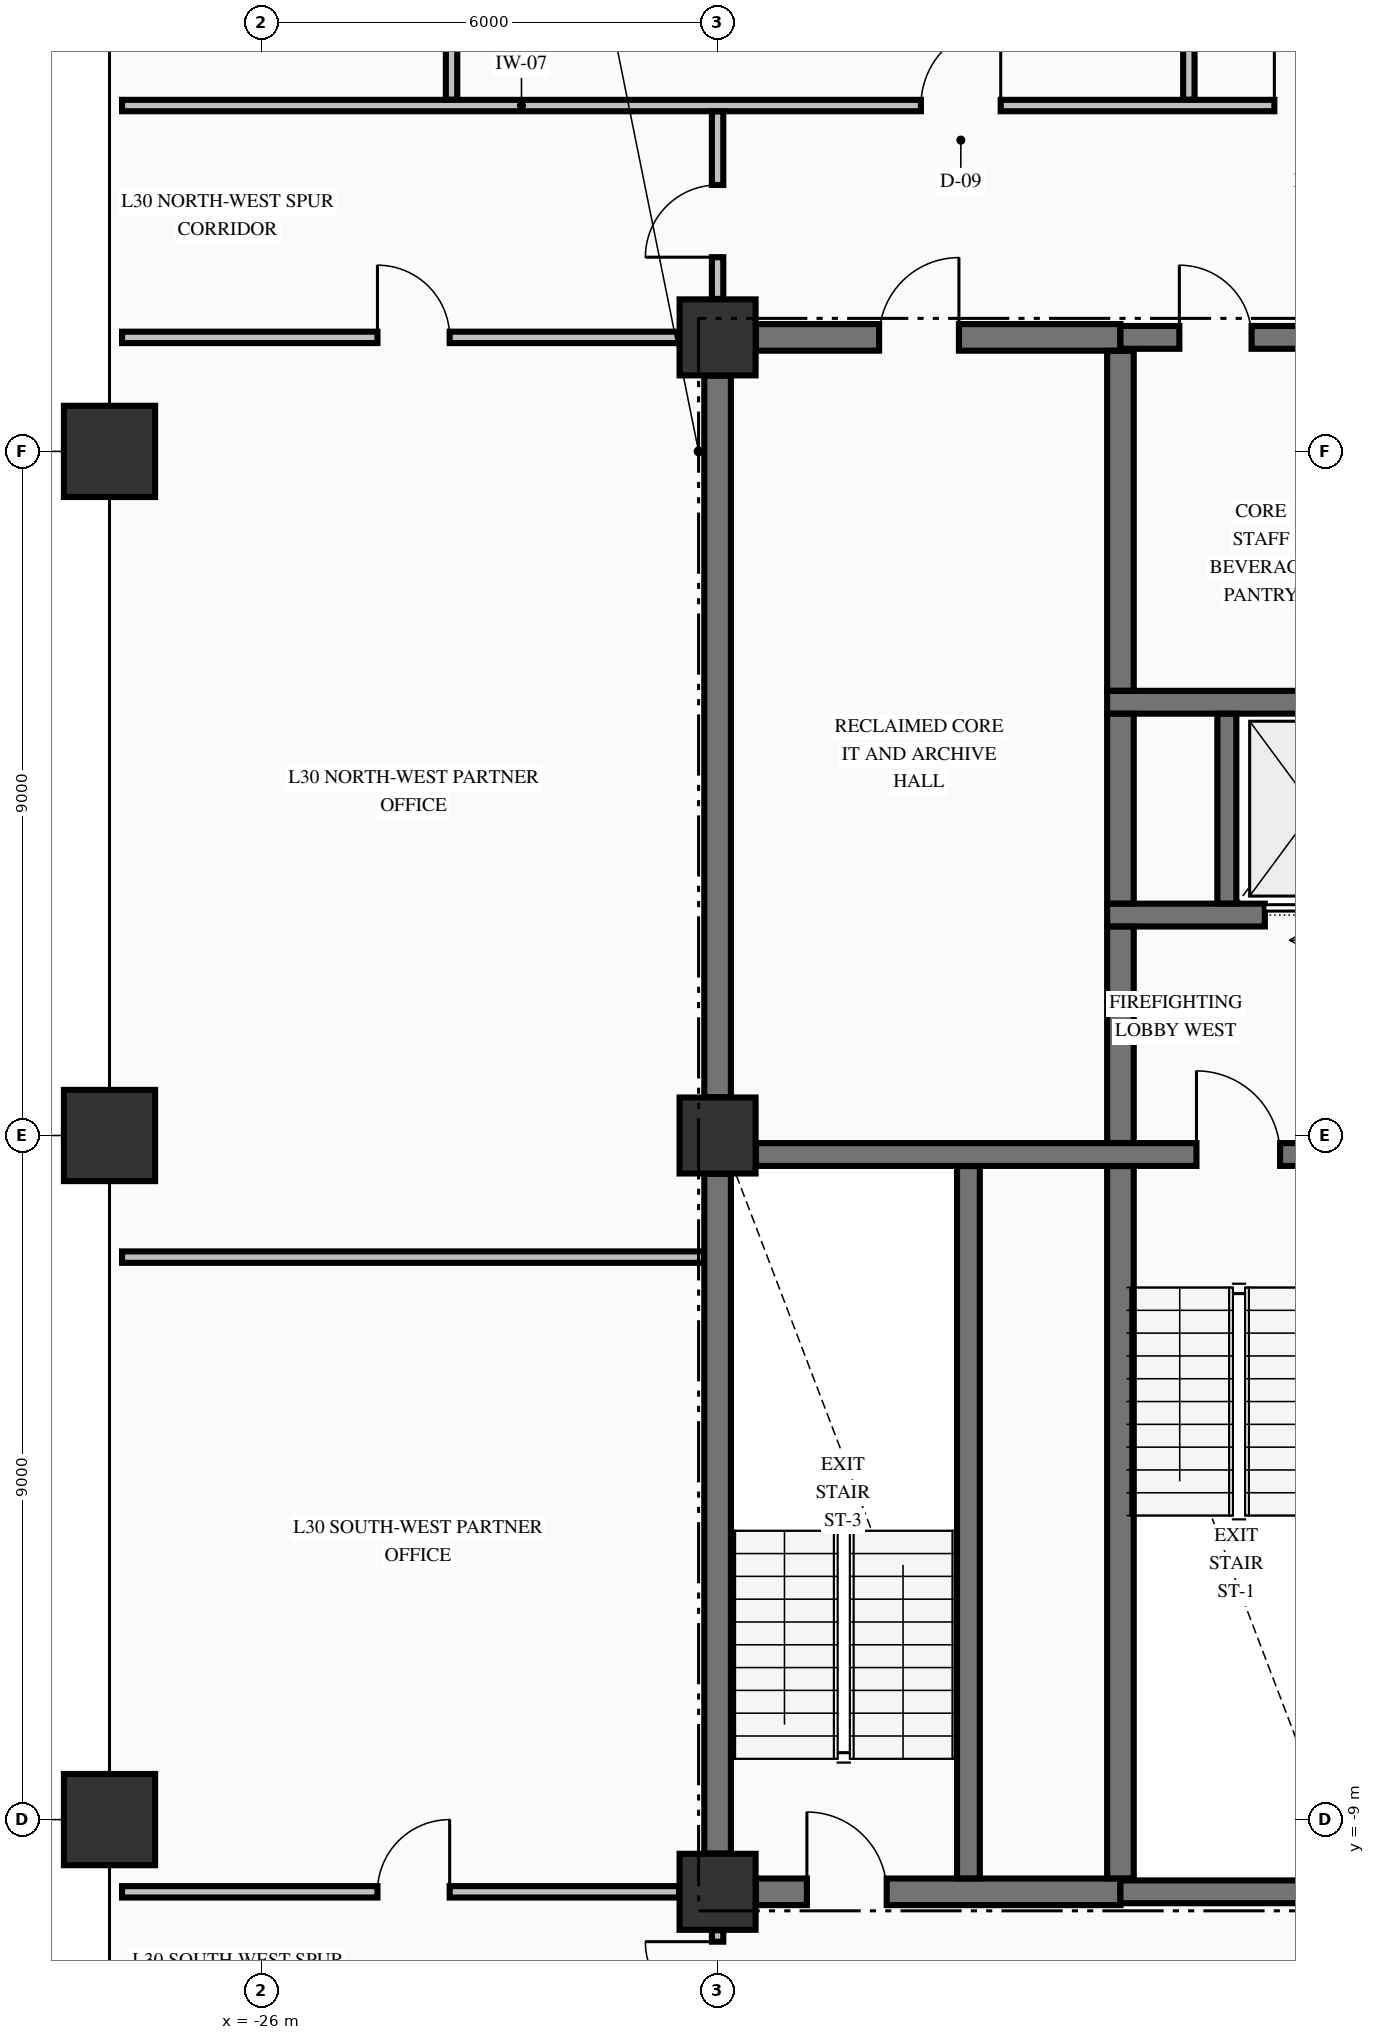
"""IFC4 building model, lengths in metres.
Left out: names, types, materials, properties, quantities, classifications, styles, units other than length and angle.
Written with IfcOpenShell. Run it as: python <this file> out.ifc"""

import sys

from ifc_helpers import new_model, si_unit, direction, frame, frame_2d, origin, origin_2d, place, context, subcontext, project, spatial, rectangle, extrude, element, fill, save


model = new_model("IFC4")
c1 = context("Model", 3, precision=1e-05, world=origin(), true_north=direction((0.0, 1.0)))
c2 = subcontext(c1, "Body", "Model", "MODEL_VIEW")
j1 = project(units=[si_unit("LENGTHUNIT", "METRE"), si_unit("PLANEANGLEUNIT", "RADIAN")], contexts=[c1])
p1 = place(None, origin())
s1 = spatial("IfcSite", under=j1, at=p1, CompositionType="ELEMENT")
p2 = place(p1, origin())
s2 = spatial("IfcBuilding", under=s1, at=p2, CompositionType="ELEMENT")
p3 = place(p2, frame((0.0, 0.0, 121.35)))
s3 = spatial("IfcBuildingStorey", under=s2, at=p3, CompositionType="ELEMENT", Elevation=121.35)
for number, where, z_axis, x_axis in (
    (1, (-28.0, -9.0, -0.425), (0.0, 0.0, 1.0), (1.0, 0.0, 0.0)),
    (2, (-28.0, 0.0, -0.425), (0.0, 0.0, 1.0), (1.0, 0.0, 0.0)),
    (3, (-28.0, 9.0, -0.425), (0.0, 0.0, 1.0), (1.0, 0.0, 0.0)),
):
    element("IfcColumn", number, at=place(p3, frame(where, z_axis=z_axis, x_axis=x_axis)), inside=s3, PredefinedType="COLUMN", context=c2, shape_type="SweptSolid", body=[
        extrude(rectangle(XDim=1.2, YDim=1.2, at=origin_2d()), origin(), (0.0, 0.0, 1.0), 3.745),
    ])
for number, where, z_axis, x_axis in (
    (4, (-20.0, -9.95, -0.425), (0.0, 0.0, 1.0), (1.0, 0.0, 0.0)),
    (5, (-20.0, 10.5, -0.425), (0.0, 0.0, 1.0), (1.0, 0.0, 0.0)),
    (6, (-20.0, 0.0, -0.425), (0.0, 0.0, 1.0), (1.0, 0.0, 0.0)),
):
    element("IfcColumn", number, at=place(p3, frame(where, z_axis=z_axis, x_axis=x_axis)), inside=s3, PredefinedType="COLUMN", context=c2, shape_type="SweptSolid", body=[
        extrude(rectangle(XDim=1.0, YDim=1.0, at=origin_2d()), origin(), (0.0, 0.0, 1.0), 3.745),
    ])
p4 = place(p3, frame((-19.496, -9.95, 0.0), z_axis=(0.0, 0.0, 1.0), x_axis=(1.0, 0.0, 0.0)))
e7 = element("IfcWall", 7, at=p4, inside=s3, PredefinedType="SHEAR", context=c2, shape_type="SweptSolid", body=[
    extrude(rectangle(XDim=4.796, YDim=0.35, at=frame_2d((2.398, 0.0))), origin(), (0.0, 0.0, 1.0), 3.32),
])
p5 = place(p4, frame((0.671, 0.0, 0.0)))
e8 = element("IfcOpeningElement", 8, at=p5, cuts=e7, PredefinedType="OPENING", context=c2, shape_type="SweptSolid", body=[
    extrude(rectangle(XDim=1.05, YDim=2.15, at=frame_2d((0.525, 1.075))), frame((0.0, 0.185, 0.0), z_axis=(0.0, -1.0, 0.0), x_axis=(1.0, 0.0, 0.0)), (0.0, 0.0, 1.0), 0.37),
])
p6 = place(p3, frame((-14.7, -9.95, 0.0), z_axis=(0.0, 0.0, 1.0), x_axis=(1.0, 0.0, 0.0)))
e9 = element("IfcWall", 9, at=p6, inside=s3, PredefinedType="SHEAR", context=c2, shape_type="SweptSolid", body=[
    extrude(rectangle(XDim=3.196, YDim=0.3, at=frame_2d((1.598, 0.0))), origin(), (0.0, 0.0, 1.0), 3.32),
])
p7 = place(p3, frame((-19.496, -0.25, 0.0), z_axis=(0.0, 0.0, 1.0), x_axis=(1.0, 0.0, 0.0)))
e10 = element("IfcWall", 10, at=p7, inside=s3, PredefinedType="SHEAR", context=c2, shape_type="SweptSolid", body=[
    extrude(rectangle(XDim=7.992, YDim=0.3, at=frame_2d((3.996, 0.0))), origin(), (0.0, 0.0, 1.0), 3.32),
])
p8 = place(p7, frame((5.796, 0.0, 0.0)))
e11 = element("IfcOpeningElement", 11, at=p8, cuts=e10, PredefinedType="OPENING", context=c2, shape_type="SweptSolid", body=[
    extrude(rectangle(XDim=1.1, YDim=2.15, at=frame_2d((0.55, 1.075))), frame((0.0, 0.16, 0.0), z_axis=(0.0, -1.0, 0.0), x_axis=(1.0, 0.0, 0.0)), (0.0, 0.0, 1.0), 0.32),
])
p9 = place(p3, frame((-14.875, 2.9, 0.0), z_axis=(0.0, 0.0, 1.0), x_axis=(1.0, 0.0, 0.0)))
e12 = element("IfcWall", 12, at=p9, inside=s3, PredefinedType="SHEAR", context=c2, shape_type="SweptSolid", body=[
    extrude(rectangle(XDim=4.025, YDim=0.3, at=frame_2d((2.012, 0.0))), origin(), (0.0, 0.0, 1.0), 3.32),
])
p10 = place(p9, frame((2.075, 0.0, 0.0)))
e13 = element("IfcOpeningElement", 13, at=p10, cuts=e12, PredefinedType="OPENING", context=c2, shape_type="SweptSolid", body=[
    extrude(rectangle(XDim=1.1, YDim=2.2, at=frame_2d((0.55, 1.1))), frame((0.0, 0.16, 0.0), z_axis=(0.0, -1.0, 0.0), x_axis=(1.0, 0.0, 0.0)), (0.0, 0.0, 1.0), 0.32),
])
p11 = place(p3, frame((-14.875, 5.7, 0.0), z_axis=(0.0, 0.0, 1.0), x_axis=(1.0, 0.0, 0.0)))
e14 = element("IfcWall", 14, at=p11, inside=s3, PredefinedType="SHEAR", context=c2, shape_type="SweptSolid", body=[
    extrude(rectangle(XDim=4.025, YDim=0.3, at=frame_2d((2.012, 0.0))), origin(), (0.0, 0.0, 1.0), 3.32),
])
p12 = place(p3, frame((-19.496, 10.5, 0.0), z_axis=(0.0, 0.0, 1.0), x_axis=(1.0, 0.0, 0.0)))
e15 = element("IfcWall", 15, at=p12, inside=s3, PredefinedType="SHEAR", context=c2, shape_type="SweptSolid", body=[
    extrude(rectangle(XDim=4.796, YDim=0.35, at=frame_2d((2.398, 0.0))), origin(), (0.0, 0.0, 1.0), 3.32),
])
p13 = place(p12, frame((1.621, 0.0, 0.0)))
e16 = element("IfcOpeningElement", 16, at=p13, cuts=e15, PredefinedType="OPENING", context=c2, shape_type="SweptSolid", body=[
    extrude(rectangle(XDim=1.05, YDim=2.15, at=frame_2d((0.525, 1.075))), frame((0.0, 0.185, 0.0), z_axis=(0.0, -1.0, 0.0), x_axis=(1.0, 0.0, 0.0)), (0.0, 0.0, 1.0), 0.37),
])
p14 = place(p3, frame((-14.7, 10.5, 0.0), z_axis=(0.0, 0.0, 1.0), x_axis=(1.0, 0.0, 0.0)))
e17 = element("IfcWall", 17, at=p14, inside=s3, PredefinedType="SHEAR", context=c2, shape_type="SweptSolid", body=[
    extrude(rectangle(XDim=3.196, YDim=0.3, at=frame_2d((1.598, 0.0))), origin(), (0.0, 0.0, 1.0), 3.32),
])
p15 = place(p14, frame((0.775, 0.0, 0.0)))
e18 = element("IfcOpeningElement", 18, at=p15, cuts=e17, PredefinedType="OPENING", context=c2, shape_type="SweptSolid", body=[
    extrude(rectangle(XDim=0.95, YDim=2.15, at=frame_2d((0.475, 1.075))), frame((0.0, 0.16, 0.0), z_axis=(0.0, -1.0, 0.0), x_axis=(1.0, 0.0, 0.0)), (0.0, 0.0, 1.0), 0.32),
])
p16 = place(p3, frame((-27.835, -9.95, 0.0), z_axis=(0.0, 0.0, 1.0), x_axis=(1.0, 0.0, 0.0)))
e19 = element("IfcWall", 19, at=p16, inside=s3, PredefinedType="PARTITIONING", context=c2, shape_type="SweptSolid", body=[
    extrude(rectangle(XDim=7.329, YDim=0.15, at=frame_2d((3.665, 0.0))), origin(), (0.0, 0.0, 1.0), 3.32),
])
p17 = place(p16, frame((3.36, 0.0, 0.0)))
e20 = element("IfcOpeningElement", 20, at=p17, cuts=e19, PredefinedType="OPENING", context=c2, shape_type="SweptSolid", body=[
    extrude(rectangle(XDim=0.95, YDim=2.15, at=frame_2d((0.475, 1.075))), frame((0.0, 0.085, 0.0), z_axis=(0.0, -1.0, 0.0), x_axis=(1.0, 0.0, 0.0)), (0.0, 0.0, 1.0), 0.17),
])
p18 = place(p3, frame((-27.835, -1.6, 0.0), z_axis=(0.0, 0.0, 1.0), x_axis=(1.0, 0.0, 0.0)))
e21 = element("IfcWall", 21, at=p18, inside=s3, PredefinedType="PARTITIONING", context=c2, shape_type="SweptSolid", body=[
    extrude(rectangle(XDim=7.657, YDim=0.15, at=frame_2d((3.829, 0.0))), origin(), (0.0, 0.0, 1.0), 3.32),
])
p19 = place(p3, frame((-27.835, 10.5, 0.0), z_axis=(0.0, 0.0, 1.0), x_axis=(1.0, 0.0, 0.0)))
e22 = element("IfcWall", 22, at=p19, inside=s3, PredefinedType="PARTITIONING", context=c2, shape_type="SweptSolid", body=[
    extrude(rectangle(XDim=7.329, YDim=0.15, at=frame_2d((3.665, 0.0))), origin(), (0.0, 0.0, 1.0), 3.32),
])
p20 = place(p19, frame((3.36, 0.0, 0.0)))
e23 = element("IfcOpeningElement", 23, at=p20, cuts=e22, PredefinedType="OPENING", context=c2, shape_type="SweptSolid", body=[
    extrude(rectangle(XDim=0.95, YDim=2.15, at=frame_2d((0.475, 1.075))), frame((0.0, 0.085, 0.0), z_axis=(0.0, -1.0, 0.0), x_axis=(1.0, 0.0, 0.0)), (0.0, 0.0, 1.0), 0.17),
])
p21 = place(p3, frame((-27.835, 13.55, 0.0), z_axis=(0.0, 0.0, 1.0), x_axis=(1.0, 0.0, 0.0)))
e24 = element("IfcWall", 24, at=p21, inside=s3, PredefinedType="PARTITIONING", context=c2, shape_type="SweptSolid", body=[
    extrude(rectangle(XDim=50.67, YDim=0.15, at=frame_2d((25.335, 0.0))), origin(), (0.0, 0.0, 1.0), 3.32),
])
p22 = place(p21, frame((10.51, 0.0, 0.0)))
e25 = element("IfcOpeningElement", 25, at=p22, cuts=e24, PredefinedType="OPENING", context=c2, shape_type="SweptSolid", body=[
    extrude(rectangle(XDim=1.05, YDim=2.15, at=frame_2d((0.525, 1.075))), frame((0.0, 0.085, 0.0), z_axis=(0.0, -1.0, 0.0), x_axis=(1.0, 0.0, 0.0)), (0.0, 0.0, 1.0), 0.17),
])
p23 = place(p21, frame((15.16, 0.0, 0.0)))
e26 = element("IfcOpeningElement", 26, at=p23, cuts=e24, PredefinedType="OPENING", context=c2, shape_type="SweptSolid", body=[
    extrude(rectangle(XDim=1.05, YDim=2.15, at=frame_2d((0.525, 1.075))), frame((0.0, 0.085, 0.0), z_axis=(0.0, -1.0, 0.0), x_axis=(1.0, 0.0, 0.0)), (0.0, 0.0, 1.0), 0.17),
])
p24 = place(p21, frame((24.91, 0.0, 0.0)))
e27 = element("IfcOpeningElement", 27, at=p24, cuts=e24, PredefinedType="OPENING", context=c2, shape_type="SweptSolid", body=[
    extrude(rectangle(XDim=1.05, YDim=2.15, at=frame_2d((0.525, 1.075))), frame((0.0, 0.085, 0.0), z_axis=(0.0, -1.0, 0.0), x_axis=(1.0, 0.0, 0.0)), (0.0, 0.0, 1.0), 0.17),
])
p25 = place(p21, frame((32.81, 0.0, 0.0)))
e28 = element("IfcOpeningElement", 28, at=p25, cuts=e24, PredefinedType="OPENING", context=c2, shape_type="SweptSolid", body=[
    extrude(rectangle(XDim=1.05, YDim=2.15, at=frame_2d((0.525, 1.075))), frame((0.0, 0.085, 0.0), z_axis=(0.0, -1.0, 0.0), x_axis=(1.0, 0.0, 0.0)), (0.0, 0.0, 1.0), 0.17),
])
p26 = place(p21, frame((41.36, 0.0, 0.0)))
e29 = element("IfcOpeningElement", 29, at=p26, cuts=e24, PredefinedType="OPENING", context=c2, shape_type="SweptSolid", body=[
    extrude(rectangle(XDim=1.05, YDim=2.15, at=frame_2d((0.525, 1.075))), frame((0.0, 0.085, 0.0), z_axis=(0.0, -1.0, 0.0), x_axis=(1.0, 0.0, 0.0)), (0.0, 0.0, 1.0), 0.17),
])
p27 = place(p3, frame((-20.0, -9.446, 0.0), z_axis=(0.0, 0.0, 1.0), x_axis=(0.0, 1.0, 0.0)))
e30 = element("IfcWall", 30, at=p27, inside=s3, PredefinedType="SHEAR", context=c2, shape_type="SweptSolid", body=[
    extrude(rectangle(XDim=8.942, YDim=0.35, at=frame_2d((4.471, 0.0))), origin(), (0.0, 0.0, 1.0), 3.32),
])
p28 = place(p3, frame((-20.0, 0.504, 0.0), z_axis=(0.0, 0.0, 1.0), x_axis=(0.0, 1.0, 0.0)))
e31 = element("IfcWall", 31, at=p28, inside=s3, PredefinedType="SHEAR", context=c2, shape_type="SweptSolid", body=[
    extrude(rectangle(XDim=9.492, YDim=0.35, at=frame_2d((4.746, 0.0))), origin(), (0.0, 0.0, 1.0), 3.32),
])
p29 = place(p3, frame((-16.7, -9.773, 0.0), z_axis=(0.0, 0.0, 1.0), x_axis=(0.0, 1.0, 0.0)))
e32 = element("IfcWall", 32, at=p29, inside=s3, PredefinedType="SHEAR", context=c2, shape_type="SweptSolid", body=[
    extrude(rectangle(XDim=9.371, YDim=0.3, at=frame_2d((4.686, 0.0))), origin(), (0.0, 0.0, 1.0), 3.32),
])
p30 = place(p3, frame((-14.7, -9.773, 0.0), z_axis=(0.0, 0.0, 1.0), x_axis=(0.0, 1.0, 0.0)))
e33 = element("IfcWall", 33, at=p30, inside=s3, PredefinedType="SHEAR", context=c2, shape_type="SweptSolid", body=[
    extrude(rectangle(XDim=9.371, YDim=0.35, at=frame_2d((4.686, 0.0))), origin(), (0.0, 0.0, 1.0), 3.32),
])
p31 = place(p3, frame((-14.7, -0.098, 0.0), z_axis=(0.0, 0.0, 1.0), x_axis=(0.0, 1.0, 0.0)))
e34 = element("IfcWall", 34, at=p31, inside=s3, PredefinedType="SHEAR", context=c2, shape_type="SweptSolid", body=[
    extrude(rectangle(XDim=2.846, YDim=0.35, at=frame_2d((1.423, 0.0))), origin(), (0.0, 0.0, 1.0), 3.32),
])
p32 = place(p3, frame((-14.7, 3.052, 0.0), z_axis=(0.0, 0.0, 1.0), x_axis=(0.0, 1.0, 0.0)))
e35 = element("IfcWall", 35, at=p32, inside=s3, PredefinedType="SHEAR", context=c2, shape_type="SweptSolid", body=[
    extrude(rectangle(XDim=2.496, YDim=0.35, at=frame_2d((1.248, 0.0))), origin(), (0.0, 0.0, 1.0), 3.32),
])
p33 = place(p3, frame((-14.7, 5.852, 0.0), z_axis=(0.0, 0.0, 1.0), x_axis=(0.0, 1.0, 0.0)))
e36 = element("IfcWall", 36, at=p33, inside=s3, PredefinedType="SHEAR", context=c2, shape_type="SweptSolid", body=[
    extrude(rectangle(XDim=4.471, YDim=0.35, at=frame_2d((2.235, 0.0))), origin(), (0.0, 0.0, 1.0), 3.32),
])
p34 = place(p3, frame((-13.3, 3.052, 0.0), z_axis=(0.0, 0.0, 1.0), x_axis=(0.0, 1.0, 0.0)))
e37 = element("IfcWall", 37, at=p34, inside=s3, PredefinedType="SOLIDWALL", context=c2, shape_type="SweptSolid", body=[
    extrude(rectangle(XDim=2.496, YDim=0.25, at=frame_2d((1.248, 0.0))), origin(), (0.0, 0.0, 1.0), 3.32),
])
p35 = place(p3, frame((-23.5, 13.628, 0.0), z_axis=(0.0, 0.0, 1.0), x_axis=(0.0, 1.0, 0.0)))
e38 = element("IfcWall", 38, at=p35, inside=s3, PredefinedType="PARTITIONING", context=c2, shape_type="SweptSolid", body=[
    extrude(rectangle(XDim=6.766, YDim=0.15, at=frame_2d((3.383, 0.0))), origin(), (0.0, 0.0, 1.0), 3.32),
])
p36 = place(p3, frame((-20.0, -12.122, 0.0), z_axis=(0.0, 0.0, 1.0), x_axis=(0.0, 1.0, 0.0)))
e39 = element("IfcWall", 39, at=p36, inside=s3, PredefinedType="PARTITIONING", context=c2, shape_type="SweptSolid", body=[
    extrude(rectangle(XDim=1.666, YDim=0.15, at=frame_2d((0.833, 0.0))), origin(), (0.0, 0.0, 1.0), 2.81),
])
p37 = place(p36, frame((0.566, 0.0, 0.0)))
e40 = element("IfcOpeningElement", 40, at=p37, cuts=e39, PredefinedType="OPENING", context=c2, shape_type="SweptSolid", body=[
    extrude(rectangle(XDim=0.95, YDim=2.15, at=frame_2d((0.475, 1.075))), frame((0.0, 0.085, 0.0), z_axis=(0.0, -1.0, 0.0), x_axis=(1.0, 0.0, 0.0)), (0.0, 0.0, 1.0), 0.17),
])
p38 = place(p3, frame((-20.0, 11.006, 0.0), z_axis=(0.0, 0.0, 1.0), x_axis=(0.0, 1.0, 0.0)))
e41 = element("IfcWall", 41, at=p38, inside=s3, PredefinedType="PARTITIONING", context=c2, shape_type="SweptSolid", body=[
    extrude(rectangle(XDim=2.466, YDim=0.15, at=frame_2d((1.233, 0.0))), origin(), (0.0, 0.0, 1.0), 2.81),
])
p39 = place(p38, frame((0.549, 0.0, 0.0)))
e42 = element("IfcOpeningElement", 42, at=p39, cuts=e41, PredefinedType="OPENING", context=c2, shape_type="SweptSolid", body=[
    extrude(rectangle(XDim=0.95, YDim=2.15, at=frame_2d((0.475, 1.075))), frame((0.0, 0.085, 0.0), z_axis=(0.0, -1.0, 0.0), x_axis=(1.0, 0.0, 0.0)), (0.0, 0.0, 1.0), 0.17),
])
p40 = place(p3, frame((-13.8, 13.628, 0.0), z_axis=(0.0, 0.0, 1.0), x_axis=(0.0, 1.0, 0.0)))
e43 = element("IfcWall", 43, at=p40, inside=s3, PredefinedType="PARTITIONING", context=c2, shape_type="SweptSolid", body=[
    extrude(rectangle(XDim=11.707, YDim=0.15, at=frame_2d((5.854, 0.0))), origin(), (0.0, 0.0, 1.0), 3.32),
])
p41 = place(p8, origin())
e44 = element("IfcDoor", 44, at=p41, inside=s3, OperationType="SINGLE_SWING_LEFT", PredefinedType="DOOR", context=c2, shape_type="SweptSolid", body=[
    extrude(rectangle(XDim=1.1, YDim=2.15, at=frame_2d((0.55, 1.075))), frame((0.0, 0.025, 0.0), z_axis=(0.0, -1.0, 0.0), x_axis=(1.0, 0.0, 0.0)), (0.0, 0.0, 1.0), 0.05),
])
fill(e11, e44)
p42 = place(p10, origin())
e45 = element("IfcDoor", 45, at=p42, inside=s3, OperationType="SLIDING_TO_LEFT", PredefinedType="DOOR", context=c2, shape_type="SweptSolid", body=[
    extrude(rectangle(XDim=1.1, YDim=2.2, at=frame_2d((0.55, 1.1))), frame((0.0, 0.025, 0.0), z_axis=(0.0, -1.0, 0.0), x_axis=(1.0, 0.0, 0.0)), (0.0, 0.0, 1.0), 0.05),
])
fill(e13, e45)
p43 = place(p15, origin())
e46 = element("IfcDoor", 46, at=p43, inside=s3, OperationType="SINGLE_SWING_LEFT", PredefinedType="DOOR", context=c2, shape_type="SweptSolid", body=[
    extrude(rectangle(XDim=0.95, YDim=2.15, at=frame_2d((0.475, 1.075))), frame((0.0, 0.025, 0.0), z_axis=(0.0, -1.0, 0.0), x_axis=(1.0, 0.0, 0.0)), (0.0, 0.0, 1.0), 0.05),
])
fill(e18, e46)
p44 = place(p5, origin())
e47 = element("IfcDoor", 47, at=p44, inside=s3, OperationType="SINGLE_SWING_LEFT", PredefinedType="DOOR", context=c2, shape_type="SweptSolid", body=[
    extrude(rectangle(XDim=1.05, YDim=2.15, at=frame_2d((0.525, 1.075))), frame((0.0, 0.025, 0.0), z_axis=(0.0, -1.0, 0.0), x_axis=(1.0, 0.0, 0.0)), (0.0, 0.0, 1.0), 0.05),
])
fill(e8, e47)
p45 = place(p13, origin())
e48 = element("IfcDoor", 48, at=p45, inside=s3, OperationType="SINGLE_SWING_RIGHT", PredefinedType="DOOR", context=c2, shape_type="SweptSolid", body=[
    extrude(rectangle(XDim=1.05, YDim=2.15, at=frame_2d((0.525, 1.075))), frame((0.0, 0.025, 0.0), z_axis=(0.0, -1.0, 0.0), x_axis=(1.0, 0.0, 0.0)), (0.0, 0.0, 1.0), 0.05),
])
fill(e16, e48)
p46 = place(p22, origin())
e49 = element("IfcDoor", 49, at=p46, inside=s3, OperationType="SINGLE_SWING_RIGHT", PredefinedType="DOOR", context=c2, shape_type="SweptSolid", body=[
    extrude(rectangle(XDim=1.05, YDim=2.15, at=frame_2d((0.525, 1.075))), frame((0.0, 0.025, 0.0), z_axis=(0.0, -1.0, 0.0), x_axis=(1.0, 0.0, 0.0)), (0.0, 0.0, 1.0), 0.05),
])
fill(e25, e49)
p47 = place(p23, origin())
e50 = element("IfcDoor", 50, at=p47, inside=s3, OperationType="SINGLE_SWING_LEFT", PredefinedType="DOOR", context=c2, shape_type="SweptSolid", body=[
    extrude(rectangle(XDim=1.05, YDim=2.15, at=frame_2d((0.525, 1.075))), frame((0.0, 0.025, 0.0), z_axis=(0.0, -1.0, 0.0), x_axis=(1.0, 0.0, 0.0)), (0.0, 0.0, 1.0), 0.05),
])
fill(e26, e50)
p48 = place(p39, origin())
e51 = element("IfcDoor", 51, at=p48, inside=s3, OperationType="SINGLE_SWING_LEFT", PredefinedType="DOOR", context=c2, shape_type="SweptSolid", body=[
    extrude(rectangle(XDim=0.95, YDim=2.15, at=frame_2d((0.475, 1.075))), frame((0.0, 0.025, 0.0), z_axis=(0.0, -1.0, 0.0), x_axis=(1.0, 0.0, 0.0)), (0.0, 0.0, 1.0), 0.05),
])
fill(e42, e51)
p49 = place(p37, origin())
e52 = element("IfcDoor", 52, at=p49, inside=s3, OperationType="SINGLE_SWING_RIGHT", PredefinedType="DOOR", context=c2, shape_type="SweptSolid", body=[
    extrude(rectangle(XDim=0.95, YDim=2.15, at=frame_2d((0.475, 1.075))), frame((0.0, 0.025, 0.0), z_axis=(0.0, -1.0, 0.0), x_axis=(1.0, 0.0, 0.0)), (0.0, 0.0, 1.0), 0.05),
])
fill(e40, e52)
p50 = place(p20, origin())
e53 = element("IfcDoor", 53, at=p50, inside=s3, OperationType="SINGLE_SWING_LEFT", PredefinedType="DOOR", context=c2, shape_type="SweptSolid", body=[
    extrude(rectangle(XDim=0.95, YDim=2.15, at=frame_2d((0.475, 1.075))), frame((0.0, 0.025, 0.0), z_axis=(0.0, -1.0, 0.0), x_axis=(1.0, 0.0, 0.0)), (0.0, 0.0, 1.0), 0.05),
])
fill(e23, e53)
p51 = place(p17, origin())
e54 = element("IfcDoor", 54, at=p51, inside=s3, OperationType="SINGLE_SWING_RIGHT", PredefinedType="DOOR", context=c2, shape_type="SweptSolid", body=[
    extrude(rectangle(XDim=0.95, YDim=2.15, at=frame_2d((0.475, 1.075))), frame((0.0, 0.025, 0.0), z_axis=(0.0, -1.0, 0.0), x_axis=(1.0, 0.0, 0.0)), (0.0, 0.0, 1.0), 0.05),
])
fill(e20, e54)
save(model, sys.argv[1])
